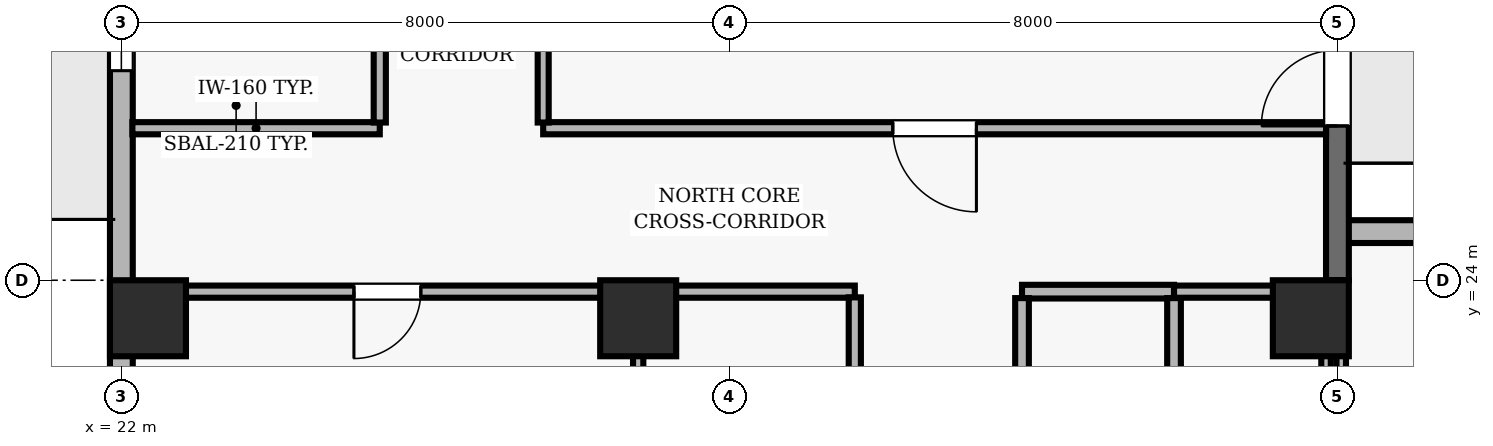
"""IFC4 building model, lengths in metres.
Left out: names, types, materials, properties, quantities, classifications, styles, units other than length and angle.
Written with IfcOpenShell. Run it as: python <this file> out.ifc"""

import sys

from ifc_helpers import new_model, si_unit, direction, frame, frame_2d, origin, origin_2d, place, context, subcontext, project, spatial, rectangle, extrude, element, fill, save


model = new_model("IFC4")
c1 = context("Model", 3, precision=1e-05, world=origin(), true_north=direction((0.0, 1.0)))
c2 = subcontext(c1, "Body", "Model", "MODEL_VIEW")
j1 = project(units=[si_unit("LENGTHUNIT", "METRE"), si_unit("PLANEANGLEUNIT", "RADIAN")], contexts=[c1])
p1 = place(None, origin())
s1 = spatial("IfcSite", under=j1, at=p1, CompositionType="ELEMENT")
p2 = place(p1, origin())
s2 = spatial("IfcBuilding", under=s1, at=p2, CompositionType="ELEMENT")
p3 = place(p2, frame((0.0, 0.0, 179.7)))
s3 = spatial("IfcBuildingStorey", under=s2, at=p3, CompositionType="ELEMENT", Elevation=179.7)
for number, where, z_axis, x_axis in (
    (1, (22.35, 23.5, 0.0), (0.0, 0.0, 1.0), (1.0, 0.0, 0.0)),
    (2, (28.8, 23.5, 0.0), (0.0, 0.0, 1.0), (1.0, 0.0, 0.0)),
    (3, (37.65, 23.5, 0.0), (0.0, 0.0, 1.0), (1.0, 0.0, 0.0)),
):
    element("IfcColumn", number, at=place(p3, frame(where, z_axis=z_axis, x_axis=x_axis)), inside=s3, PredefinedType="COLUMN", context=c2, shape_type="SweptSolid", body=[
        extrude(rectangle(XDim=1.0, YDim=1.0, at=origin_2d()), origin(), (0.0, 0.0, 1.0), 3.9),
    ])
p4 = place(p3, frame((48.8, 24.64, 0.0), z_axis=(0.0, 0.0, 1.0), x_axis=(-1.0, 0.0, 0.0)))
e4 = element("IfcWall", 4, at=p4, inside=s3, PredefinedType="SOLIDWALL", context=c2, shape_type="SweptSolid", body=[
    extrude(rectangle(XDim=10.8, YDim=0.3, at=frame_2d((5.4, 0.0))), origin(), (0.0, 0.0, 1.0), 3.69),
])
p5 = place(p4, frame((4.5, 0.0, 0.9)))
e5 = element("IfcOpeningElement", 5, at=p5, cuts=e4, PredefinedType="OPENING", context=c2, shape_type="SweptSolid", body=[
    extrude(rectangle(XDim=1.8, YDim=1.6, at=frame_2d((0.9, 0.8))), frame((0.0, 0.16, 0.0), z_axis=(0.0, -1.0, 0.0), x_axis=(1.0, 0.0, 0.0)), (0.0, 0.0, 1.0), 0.32),
])
p6 = place(p3, frame((38.0, 24.0, 0.0), z_axis=(0.0, 0.0, 1.0), x_axis=(0.0, 1.0, 0.0)))
e6 = element("IfcWall", 6, at=p6, inside=s3, PredefinedType="SOLIDWALL", context=c2, shape_type="SweptSolid", body=[
    extrude(rectangle(XDim=16.7, YDim=0.3, at=frame_2d((8.35, 0.0))), origin(), (0.0, 0.0, 1.0), 3.69),
])
p7 = place(p6, frame((2.03, 0.0, 0.0)))
e7 = element("IfcOpeningElement", 7, at=p7, cuts=e6, PredefinedType="OPENING", context=c2, shape_type="SweptSolid", body=[
    extrude(rectangle(XDim=1.0, YDim=2.2, at=frame_2d((0.5, 1.1))), frame((0.0, 0.16, 0.0), z_axis=(0.0, -1.0, 0.0), x_axis=(1.0, 0.0, 0.0)), (0.0, 0.0, 1.0), 0.32),
])
p8 = place(p3, frame((22.0, 40.7, 0.0), z_axis=(0.0, 0.0, 1.0), x_axis=(0.0, -1.0, 0.0)))
e8 = element("IfcWall", 8, at=p8, inside=s3, PredefinedType="SOLIDWALL", context=c2, shape_type="SweptSolid", body=[
    extrude(rectangle(XDim=38.2, YDim=0.3, at=frame_2d((19.1, 0.0))), origin(), (0.0, 0.0, 1.0), 3.69),
])
p9 = place(p8, frame((6.7, 0.0, 0.0)))
e9 = element("IfcOpeningElement", 9, at=p9, cuts=e8, PredefinedType="OPENING", context=c2, shape_type="SweptSolid", body=[
    extrude(rectangle(XDim=1.0, YDim=2.2, at=frame_2d((0.5, 1.1))), frame((0.0, 0.16, 0.0), z_axis=(0.0, -1.0, 0.0), x_axis=(1.0, 0.0, 0.0)), (0.0, 0.0, 1.0), 0.32),
])
p10 = place(p8, frame((11.543, 0.0, 0.9)))
e10 = element("IfcOpeningElement", 10, at=p10, cuts=e8, PredefinedType="OPENING", context=c2, shape_type="SweptSolid", body=[
    extrude(rectangle(XDim=2.4, YDim=1.8, at=frame_2d((1.2, 0.9))), frame((0.0, 0.16, 0.0), z_axis=(0.0, -1.0, 0.0), x_axis=(1.0, 0.0, 0.0)), (0.0, 0.0, 1.0), 0.32),
])
p11 = place(p8, frame((18.35, 0.0, 0.9)))
e11 = element("IfcOpeningElement", 11, at=p11, cuts=e8, PredefinedType="OPENING", context=c2, shape_type="SweptSolid", body=[
    extrude(rectangle(XDim=2.4, YDim=1.8, at=frame_2d((1.2, 0.9))), frame((0.0, 0.16, 0.0), z_axis=(0.0, -1.0, 0.0), x_axis=(1.0, 0.0, 0.0)), (0.0, 0.0, 1.0), 0.32),
])
p12 = place(p8, frame((22.907, 0.0, 0.9)))
e12 = element("IfcOpeningElement", 12, at=p12, cuts=e8, PredefinedType="OPENING", context=c2, shape_type="SweptSolid", body=[
    extrude(rectangle(XDim=2.4, YDim=1.8, at=frame_2d((1.2, 0.9))), frame((0.0, 0.16, 0.0), z_axis=(0.0, -1.0, 0.0), x_axis=(1.0, 0.0, 0.0)), (0.0, 0.0, 1.0), 0.32),
])
p13 = place(p8, frame((28.814, 0.0, 0.9)))
e13 = element("IfcOpeningElement", 13, at=p13, cuts=e8, PredefinedType="OPENING", context=c2, shape_type="SweptSolid", body=[
    extrude(rectangle(XDim=2.4, YDim=1.8, at=frame_2d((1.2, 0.9))), frame((0.0, 0.16, 0.0), z_axis=(0.0, -1.0, 0.0), x_axis=(1.0, 0.0, 0.0)), (0.0, 0.0, 1.0), 0.32),
])
p14 = place(p3, frame((25.4, 26.0, 0.0), z_axis=(0.0, 0.0, 1.0), x_axis=(-1.0, 0.0, 0.0)))
e14 = element("IfcWall", 14, at=p14, inside=s3, PredefinedType="PARTITIONING", context=c2, shape_type="SweptSolid", body=[
    extrude(rectangle(XDim=3.255, YDim=0.16, at=frame_2d((1.627, 0.0))), origin(), (0.0, 0.0, 1.0), 3.69),
])
p15 = place(p3, frame((28.8, 23.85, 0.0), z_axis=(0.0, 0.0, 1.0), x_axis=(-1.0, 0.0, 0.0)))
e15 = element("IfcWall", 15, at=p15, inside=s3, PredefinedType="PARTITIONING", context=c2, shape_type="SweptSolid", body=[
    extrude(rectangle(XDim=6.6, YDim=0.16, at=frame_2d((3.3, 0.0))), origin(), (0.0, 0.0, 1.0), 3.146),
])
p16 = place(p15, frame((2.86, 0.0, 0.0)))
e16 = element("IfcOpeningElement", 16, at=p16, cuts=e15, PredefinedType="OPENING", context=c2, shape_type="SweptSolid", body=[
    extrude(rectangle(XDim=0.88, YDim=2.1, at=frame_2d((0.44, 1.05))), frame((0.0, 0.09, 0.0), z_axis=(0.0, -1.0, 0.0), x_axis=(1.0, 0.0, 0.0)), (0.0, 0.0, 1.0), 0.18),
])
p17 = place(p3, frame((31.65, 23.85, 0.0), z_axis=(0.0, 0.0, 1.0), x_axis=(-1.0, 0.0, 0.0)))
e17 = element("IfcWall", 17, at=p17, inside=s3, PredefinedType="PARTITIONING", context=c2, shape_type="SweptSolid", body=[
    extrude(rectangle(XDim=2.85, YDim=0.16, at=frame_2d((1.425, 0.0))), origin(), (0.0, 0.0, 1.0), 3.146),
])
p18 = place(p3, frame((35.85, 23.85, 0.0), z_axis=(0.0, 0.0, 1.0), x_axis=(-1.0, 0.0, 0.0)))
e18 = element("IfcWall", 18, at=p18, inside=s3, PredefinedType="PARTITIONING", context=c2, shape_type="SweptSolid", body=[
    extrude(rectangle(XDim=2.0, YDim=0.18, at=frame_2d((1.0, 0.0))), origin(), (0.0, 0.0, 1.0), 3.146),
])
p19 = place(p3, frame((37.85, 23.85, 0.0), z_axis=(0.0, 0.0, 1.0), x_axis=(-1.0, 0.0, 0.0)))
e19 = element("IfcWall", 19, at=p19, inside=s3, PredefinedType="PARTITIONING", context=c2, shape_type="SweptSolid", body=[
    extrude(rectangle(XDim=2.0, YDim=0.16, at=frame_2d((1.0, 0.0))), origin(), (0.0, 0.0, 1.0), 3.146),
])
p20 = place(p3, frame((37.85, 26.0, 0.0), z_axis=(0.0, 0.0, 1.0), x_axis=(-1.0, 0.0, 0.0)))
e20 = element("IfcWall", 20, at=p20, inside=s3, PredefinedType="PARTITIONING", context=c2, shape_type="SweptSolid", body=[
    extrude(rectangle(XDim=10.3, YDim=0.16, at=frame_2d((5.15, 0.0))), origin(), (0.0, 0.0, 1.0), 3.69),
])
p21 = place(p20, frame((4.6, 0.0, 0.0)))
e21 = element("IfcOpeningElement", 21, at=p21, cuts=e20, PredefinedType="OPENING", context=c2, shape_type="SweptSolid", body=[
    extrude(rectangle(XDim=1.1, YDim=2.15, at=frame_2d((0.55, 1.075))), frame((0.0, 0.09, 0.0), z_axis=(0.0, -1.0, 0.0), x_axis=(1.0, 0.0, 0.0)), (0.0, 0.0, 1.0), 0.18),
])
p22 = place(p3, frame((25.4, 31.765, 0.0), z_axis=(0.0, 0.0, 1.0), x_axis=(0.0, -1.0, 0.0)))
e22 = element("IfcWall", 22, at=p22, inside=s3, PredefinedType="PARTITIONING", context=c2, shape_type="SweptSolid", body=[
    extrude(rectangle(XDim=5.69, YDim=0.16, at=frame_2d((2.845, 0.0))), origin(), (0.0, 0.0, 1.0), 3.69),
])
p23 = place(p22, frame((2.345, 0.0, 0.0)))
e23 = element("IfcOpeningElement", 23, at=p23, cuts=e22, PredefinedType="OPENING", context=c2, shape_type="SweptSolid", body=[
    extrude(rectangle(XDim=1.0, YDim=2.1, at=frame_2d((0.5, 1.05))), frame((0.0, 0.09, 0.0), z_axis=(0.0, -1.0, 0.0), x_axis=(1.0, 0.0, 0.0)), (0.0, 0.0, 1.0), 0.18),
])
p24 = place(p3, frame((27.55, 26.075, 0.0), z_axis=(0.0, 0.0, 1.0), x_axis=(0.0, 1.0, 0.0)))
e24 = element("IfcWall", 24, at=p24, inside=s3, PredefinedType="PARTITIONING", context=c2, shape_type="SweptSolid", body=[
    extrude(rectangle(XDim=5.708, YDim=0.145, at=frame_2d((2.854, 0.0))), origin(), (0.0, 0.0, 1.0), 3.69),
])
p25 = place(p3, frame((28.8, 23.775, 0.0), z_axis=(0.0, 0.0, 1.0), x_axis=(0.0, -1.0, 0.0)))
e25 = element("IfcWall", 25, at=p25, inside=s3, PredefinedType="PARTITIONING", context=c2, shape_type="SweptSolid", body=[
    extrude(rectangle(XDim=4.615, YDim=0.135, at=frame_2d((2.308, 0.0))), origin(), (0.0, 0.0, 1.0), 3.69),
])
p26 = place(p3, frame((31.65, 19.01, 0.0), z_axis=(0.0, 0.0, 1.0), x_axis=(0.0, 1.0, 0.0)))
e26 = element("IfcWall", 26, at=p26, inside=s3, PredefinedType="PARTITIONING", context=c2, shape_type="SweptSolid", body=[
    extrude(rectangle(XDim=4.765, YDim=0.16, at=frame_2d((2.382, 0.0))), origin(), (0.0, 0.0, 1.0), 3.69),
])
p27 = place(p26, frame((1.932, 0.0, 0.0)))
e27 = element("IfcOpeningElement", 27, at=p27, cuts=e26, PredefinedType="OPENING", context=c2, shape_type="SweptSolid", body=[
    extrude(rectangle(XDim=0.9, YDim=2.1, at=frame_2d((0.45, 1.05))), frame((0.0, 0.09, 0.0), z_axis=(0.0, -1.0, 0.0), x_axis=(1.0, 0.0, 0.0)), (0.0, 0.0, 1.0), 0.18),
])
p28 = place(p3, frame((33.85, 17.735, 0.0), z_axis=(0.0, 0.0, 1.0), x_axis=(0.0, 1.0, 0.0)))
e28 = element("IfcWall", 28, at=p28, inside=s3, PredefinedType="PARTITIONING", context=c2, shape_type="SweptSolid", body=[
    extrude(rectangle(XDim=6.03, YDim=0.18, at=frame_2d((3.015, 0.0))), origin(), (0.0, 0.0, 1.0), 3.69),
])
p29 = place(p28, frame((2.54, 0.0, 0.0)))
e29 = element("IfcOpeningElement", 29, at=p29, cuts=e28, PredefinedType="OPENING", context=c2, shape_type="SweptSolid", body=[
    extrude(rectangle(XDim=0.95, YDim=2.1, at=frame_2d((0.475, 1.05))), frame((0.0, 0.1, 0.0), z_axis=(0.0, -1.0, 0.0), x_axis=(1.0, 0.0, 0.0)), (0.0, 0.0, 1.0), 0.2),
])
p30 = place(p3, frame((35.85, 21.258, 0.0), z_axis=(0.0, 0.0, 1.0), x_axis=(0.0, 1.0, 0.0)))
e30 = element("IfcWall", 30, at=p30, inside=s3, PredefinedType="PARTITIONING", context=c2, shape_type="SweptSolid", body=[
    extrude(rectangle(XDim=2.507, YDim=0.18, at=frame_2d((1.253, 0.0))), origin(), (0.0, 0.0, 1.0), 3.69),
])
p31 = place(p30, frame((0.454, 0.0, 0.0)))
e31 = element("IfcOpeningElement", 31, at=p31, cuts=e30, PredefinedType="OPENING", context=c2, shape_type="SweptSolid", body=[
    extrude(rectangle(XDim=0.9, YDim=2.1, at=frame_2d((0.45, 1.05))), frame((0.0, 0.1, 0.0), z_axis=(0.0, -1.0, 0.0), x_axis=(1.0, 0.0, 0.0)), (0.0, 0.0, 1.0), 0.2),
])
p32 = place(p3, frame((37.85, 21.258, 0.0), z_axis=(0.0, 0.0, 1.0), x_axis=(0.0, 1.0, 0.0)))
e32 = element("IfcWall", 32, at=p32, inside=s3, PredefinedType="PARTITIONING", context=c2, shape_type="SweptSolid", body=[
    extrude(rectangle(XDim=2.517, YDim=0.125, at=frame_2d((1.258, 0.0))), origin(), (0.0, 0.0, 1.0), 3.146),
])
p33 = place(p3, frame((38.05, 24.0, 0.0), z_axis=(0.0, 0.0, 1.0), x_axis=(0.0, -1.0, 0.0)))
e33 = element("IfcWall", 33, at=p33, inside=s3, PredefinedType="PARTITIONING", context=c2, shape_type="SweptSolid", body=[
    extrude(rectangle(XDim=7.925, YDim=0.125, at=frame_2d((3.962, 0.0))), origin(), (0.0, 0.0, 1.0), 3.146),
])
p34 = place(p7, origin())
e34 = element("IfcDoor", 34, at=p34, inside=s3, OperationType="SINGLE_SWING_LEFT", PredefinedType="DOOR", context=c2, shape_type="SweptSolid", body=[
    extrude(rectangle(XDim=1.0, YDim=2.2, at=frame_2d((0.5, 1.1))), frame((0.0, 0.025, 0.0), z_axis=(0.0, -1.0, 0.0), x_axis=(1.0, 0.0, 0.0)), (0.0, 0.0, 1.0), 0.05),
])
fill(e7, e34)
p35 = place(p10, origin())
e35 = element("IfcWindow", 35, at=p35, inside=s3, PartitioningType="SINGLE_PANEL", PredefinedType="WINDOW", context=c2, shape_type="SweptSolid", body=[
    extrude(rectangle(XDim=2.4, YDim=1.8, at=frame_2d((1.2, 0.9))), frame((0.0, 0.03, 0.0), z_axis=(0.0, -1.0, 0.0), x_axis=(1.0, 0.0, 0.0)), (0.0, 0.0, 1.0), 0.06),
])
fill(e10, e35)
p36 = place(p16, origin())
e36 = element("IfcDoor", 36, at=p36, inside=s3, OperationType="SINGLE_SWING_RIGHT", PredefinedType="DOOR", context=c2, shape_type="SweptSolid", body=[
    extrude(rectangle(XDim=0.88, YDim=2.1, at=frame_2d((0.44, 1.05))), frame((0.0, 0.025, 0.0), z_axis=(0.0, -1.0, 0.0), x_axis=(1.0, 0.0, 0.0)), (0.0, 0.0, 1.0), 0.05),
])
fill(e16, e36)
p37 = place(p21, origin())
e37 = element("IfcDoor", 37, at=p37, inside=s3, OperationType="SINGLE_SWING_LEFT", PredefinedType="DOOR", context=c2, shape_type="SweptSolid", body=[
    extrude(rectangle(XDim=1.1, YDim=2.15, at=frame_2d((0.55, 1.075))), frame((0.0, 0.025, 0.0), z_axis=(0.0, -1.0, 0.0), x_axis=(1.0, 0.0, 0.0)), (0.0, 0.0, 1.0), 0.05),
])
fill(e21, e37)
save(model, sys.argv[1])
